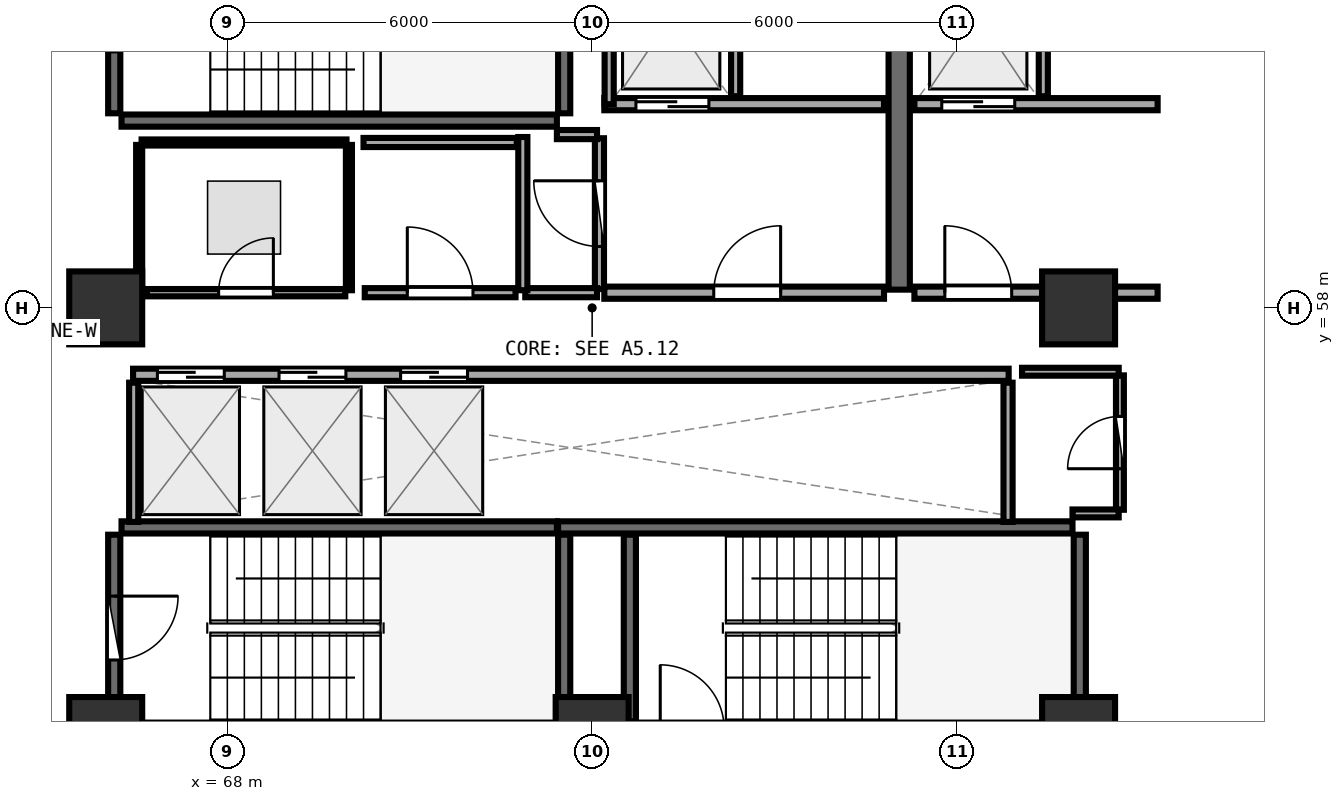
"""IFC4 building model, lengths in metres.
Left out: names, types, materials, properties, quantities, classifications, styles, units other than length and angle.
Written with IfcOpenShell. Run it as: python <this file> out.ifc"""

import sys

from ifc_helpers import new_model, si_unit, direction, frame, frame_2d, origin, origin_2d, place, context, subcontext, project, spatial, rectangle, extrude, element, fill, save


model = new_model("IFC4")
c1 = context("Model", 3, precision=1e-05, world=origin(), true_north=direction((0.0, 1.0)))
c2 = subcontext(c1, "Body", "Model", "MODEL_VIEW")
j1 = project(units=[si_unit("LENGTHUNIT", "METRE"), si_unit("PLANEANGLEUNIT", "RADIAN")], contexts=[c1])
p1 = place(None, origin())
s1 = spatial("IfcSite", under=j1, at=p1, CompositionType="ELEMENT")
p2 = place(p1, origin())
s2 = spatial("IfcBuilding", under=s1, at=p2, CompositionType="ELEMENT")
p3 = place(p2, frame((0.0, 0.0, 180.6)))
s3 = spatial("IfcBuildingStorey", under=s2, at=p3, CompositionType="ELEMENT", Elevation=180.6)
for number, where, z_axis, x_axis in (
    (1, (66.0, 51.0, 0.0), (0.0, 0.0, 1.0), (1.0, 0.0, 0.0)),
    (2, (74.0, 51.0, 0.0), (0.0, 0.0, 1.0), (1.0, 0.0, 0.0)),
    (3, (82.0, 51.0, 0.0), (0.0, 0.0, 1.0), (1.0, 0.0, 0.0)),
    (4, (82.0, 58.0, 0.0), (0.0, 0.0, 1.0), (1.0, 0.0, 0.0)),
    (5, (66.0, 58.0, 0.0), (0.0, 0.0, 1.0), (1.0, 0.0, 0.0)),
):
    element("IfcColumn", number, at=place(p3, frame(where, z_axis=z_axis, x_axis=x_axis)), inside=s3, PredefinedType="PILASTER", context=c2, shape_type="SweptSolid", body=[
        extrude(rectangle(XDim=1.2, YDim=1.2, at=origin_2d()), origin(), (0.0, 0.0, 1.0), 3.75),
    ])
p4 = place(p3, frame((66.26, 61.08, 0.0), z_axis=(0.0, 0.0, 1.0), x_axis=(1.0, 0.0, 0.0)))
e6 = element("IfcWall", 6, at=p4, inside=s3, PredefinedType="SHEAR", context=c2, shape_type="SweptSolid", body=[
    extrude(rectangle(XDim=7.16, YDim=0.2, at=frame_2d((3.58, 0.0))), origin(), (0.0, 0.0, 1.0), 3.49),
])
p5 = place(p3, frame((73.54, 61.2, 0.0), z_axis=(0.0, 0.0, 1.0), x_axis=(0.0, 1.0, 0.0)))
e7 = element("IfcWall", 7, at=p5, inside=s3, PredefinedType="SHEAR", context=c2, shape_type="SweptSolid", body=[
    extrude(rectangle(XDim=3.07, YDim=0.2, at=frame_2d((1.535, 0.0))), origin(), (0.0, 0.0, 1.0), 3.49),
])
p6 = place(p3, frame((66.14, 64.27, 0.0), z_axis=(0.0, 0.0, 1.0), x_axis=(0.0, -1.0, 0.0)))
e8 = element("IfcWall", 8, at=p6, inside=s3, PredefinedType="SHEAR", context=c2, shape_type="SweptSolid", body=[
    extrude(rectangle(XDim=3.07, YDim=0.2, at=frame_2d((1.535, 0.0))), origin(), (0.0, 0.0, 1.0), 3.49),
])
p7 = place(p6, frame((1.01, 0.0, 0.0)))
e9 = element("IfcOpeningElement", 9, at=p7, cuts=e8, PredefinedType="OPENING", context=c2, shape_type="SweptSolid", body=[
    extrude(rectangle(XDim=1.05, YDim=2.1, at=frame_2d((0.525, 1.05))), frame((0.0, 0.11, 0.0), z_axis=(0.0, -1.0, 0.0), x_axis=(1.0, 0.0, 0.0)), (0.0, 0.0, 1.0), 0.22),
])
p8 = place(p3, frame((82.02, 51.2, 0.0), z_axis=(0.0, 0.0, 1.0), x_axis=(0.0, 1.0, 0.0)))
e10 = element("IfcWall", 10, at=p8, inside=s3, PredefinedType="SHEAR", context=c2, shape_type="SweptSolid", body=[
    extrude(rectangle(XDim=3.07, YDim=0.2, at=frame_2d((1.535, 0.0))), origin(), (0.0, 0.0, 1.0), 3.49),
])
p9 = place(p3, frame((81.9, 54.39, 0.0), z_axis=(0.0, 0.0, 1.0), x_axis=(-1.0, 0.0, 0.0)))
e11 = element("IfcWall", 11, at=p9, inside=s3, PredefinedType="SHEAR", context=c2, shape_type="SweptSolid", body=[
    extrude(rectangle(XDim=8.46, YDim=0.2, at=frame_2d((4.23, 0.0))), origin(), (0.0, 0.0, 1.0), 3.49),
])
for number, where, z_axis, x_axis in (
    (12, (74.62, 54.27, 0.0), (0.0, 0.0, 1.0), (0.0, -1.0, 0.0)),
    (13, (73.54, 51.2, 0.0), (0.0, 0.0, 1.0), (0.0, 1.0, 0.0)),
):
    element("IfcWall", number, at=place(p3, frame(where, z_axis=z_axis, x_axis=x_axis)), inside=s3, PredefinedType="SHEAR", context=c2, shape_type="SweptSolid", body=[
        extrude(rectangle(XDim=3.07, YDim=0.2, at=frame_2d((1.535, 0.0))), origin(), (0.0, 0.0, 1.0), 3.49),
    ])
p10 = place(p3, frame((73.42, 54.39, 0.0), z_axis=(0.0, 0.0, 1.0), x_axis=(-1.0, 0.0, 0.0)))
e14 = element("IfcWall", 14, at=p10, inside=s3, PredefinedType="SHEAR", context=c2, shape_type="SweptSolid", body=[
    extrude(rectangle(XDim=7.16, YDim=0.2, at=frame_2d((3.58, 0.0))), origin(), (0.0, 0.0, 1.0), 3.49),
])
p11 = place(p3, frame((66.14, 54.27, 0.0), z_axis=(0.0, 0.0, 1.0), x_axis=(0.0, -1.0, 0.0)))
e15 = element("IfcWall", 15, at=p11, inside=s3, PredefinedType="SHEAR", context=c2, shape_type="SweptSolid", body=[
    extrude(rectangle(XDim=3.07, YDim=0.2, at=frame_2d((1.535, 0.0))), origin(), (0.0, 0.0, 1.0), 3.49),
])
p12 = place(p11, frame((1.01, 0.0, 0.0)))
e16 = element("IfcOpeningElement", 16, at=p12, cuts=e15, PredefinedType="OPENING", context=c2, shape_type="SweptSolid", body=[
    extrude(rectangle(XDim=1.05, YDim=2.1, at=frame_2d((0.525, 1.05))), frame((0.0, 0.11, 0.0), z_axis=(0.0, -1.0, 0.0), x_axis=(1.0, 0.0, 0.0)), (0.0, 0.0, 1.0), 0.22),
])
p13 = place(p3, frame((79.05, 58.3, 0.0), z_axis=(0.0, 0.0, 1.0), x_axis=(0.0, 1.0, 0.0)))
e17 = element("IfcWall", 17, at=p13, inside=s3, PredefinedType="SHEAR", context=c2, shape_type="SweptSolid", body=[
    extrude(rectangle(XDim=6.3, YDim=0.35, at=frame_2d((3.15, 0.0))), origin(), (0.0, 0.0, 1.0), 3.49),
])
p14 = place(p3, frame((74.2, 61.35, 0.0), z_axis=(0.0, 0.0, 1.0), x_axis=(1.0, 0.0, 0.0)))
e18 = element("IfcWall", 18, at=p14, inside=s3, PredefinedType="SOLIDWALL", context=c2, shape_type="SweptSolid", body=[
    extrude(rectangle(XDim=4.6, YDim=0.2, at=frame_2d((2.3, 0.0))), origin(), (0.0, 0.0, 1.0), 3.48),
])
p15 = place(p14, frame((0.52, 0.0, 0.0)))
e19 = element("IfcOpeningElement", 19, at=p15, cuts=e18, PredefinedType="OPENING", context=c2, shape_type="SweptSolid", body=[
    extrude(rectangle(XDim=1.2, YDim=2.15, at=frame_2d((0.6, 1.075))), frame((0.0, 0.11, 0.0), z_axis=(0.0, -1.0, 0.0), x_axis=(1.0, 0.0, 0.0)), (0.0, 0.0, 1.0), 0.22),
])
p16 = place(p3, frame((74.28, 61.35, 0.0), z_axis=(0.0, 0.0, 1.0), x_axis=(0.0, 1.0, 0.0)))
e20 = element("IfcWall", 20, at=p16, inside=s3, PredefinedType="PARTITIONING", context=c2, shape_type="SweptSolid", body=[
    extrude(rectangle(XDim=2.97, YDim=0.15, at=frame_2d((1.485, 0.0))), origin(), (0.0, 0.0, 1.0), 3.48),
])
p17 = place(p3, frame((76.36, 61.48, 0.0), z_axis=(0.0, 0.0, 1.0), x_axis=(0.0, 1.0, 0.0)))
e21 = element("IfcWall", 21, at=p17, inside=s3, PredefinedType="PARTITIONING", context=c2, shape_type="SweptSolid", body=[
    extrude(rectangle(XDim=2.84, YDim=0.15, at=frame_2d((1.42, 0.0))), origin(), (0.0, 0.0, 1.0), 3.48),
])
p18 = place(p3, frame((79.3, 61.35, 0.0), z_axis=(0.0, 0.0, 1.0), x_axis=(1.0, 0.0, 0.0)))
e22 = element("IfcWall", 22, at=p18, inside=s3, PredefinedType="SOLIDWALL", context=c2, shape_type="SweptSolid", body=[
    extrude(rectangle(XDim=4.0, YDim=0.2, at=frame_2d((2.0, 0.0))), origin(), (0.0, 0.0, 1.0), 2.775),
])
p19 = place(p18, frame((0.45, 0.0, 0.0)))
e23 = element("IfcOpeningElement", 23, at=p19, cuts=e22, PredefinedType="OPENING", context=c2, shape_type="SweptSolid", body=[
    extrude(rectangle(XDim=1.2, YDim=2.15, at=frame_2d((0.6, 1.075))), frame((0.0, 0.11, 0.0), z_axis=(0.0, -1.0, 0.0), x_axis=(1.0, 0.0, 0.0)), (0.0, 0.0, 1.0), 0.22),
])
p20 = place(p3, frame((81.42, 61.48, 0.0), z_axis=(0.0, 0.0, 1.0), x_axis=(0.0, 1.0, 0.0)))
e24 = element("IfcWall", 24, at=p20, inside=s3, PredefinedType="PARTITIONING", context=c2, shape_type="SweptSolid", body=[
    extrude(rectangle(XDim=2.84, YDim=0.15, at=frame_2d((1.42, 0.0))), origin(), (0.0, 0.0, 1.0), 3.48),
])
p21 = place(p3, frame((74.2, 58.25, 0.0), z_axis=(0.0, 0.0, 1.0), x_axis=(1.0, 0.0, 0.0)))
e25 = element("IfcWall", 25, at=p21, inside=s3, PredefinedType="SOLIDWALL", context=c2, shape_type="SweptSolid", body=[
    extrude(rectangle(XDim=4.6, YDim=0.2, at=frame_2d((2.3, 0.0))), origin(), (0.0, 0.0, 1.0), 3.48),
])
p22 = place(p21, frame((1.8, 0.0, 0.0)))
e26 = element("IfcOpeningElement", 26, at=p22, cuts=e25, PredefinedType="OPENING", context=c2, shape_type="SweptSolid", body=[
    extrude(rectangle(XDim=1.1, YDim=2.1, at=frame_2d((0.55, 1.05))), frame((0.0, 0.11, 0.0), z_axis=(0.0, -1.0, 0.0), x_axis=(1.0, 0.0, 0.0)), (0.0, 0.0, 1.0), 0.22),
])
p23 = place(p3, frame((79.3, 58.25, 0.0), z_axis=(0.0, 0.0, 1.0), x_axis=(1.0, 0.0, 0.0)))
e27 = element("IfcWall", 27, at=p23, inside=s3, PredefinedType="SOLIDWALL", context=c2, shape_type="SweptSolid", body=[
    extrude(rectangle(XDim=4.0, YDim=0.2, at=frame_2d((2.0, 0.0))), origin(), (0.0, 0.0, 1.0), 2.775),
])
p24 = place(p23, frame((0.5, 0.0, 0.0)))
e28 = element("IfcOpeningElement", 28, at=p24, cuts=e27, PredefinedType="OPENING", context=c2, shape_type="SweptSolid", body=[
    extrude(rectangle(XDim=1.1, YDim=2.1, at=frame_2d((0.55, 1.05))), frame((0.0, 0.11, 0.0), z_axis=(0.0, -1.0, 0.0), x_axis=(1.0, 0.0, 0.0)), (0.0, 0.0, 1.0), 0.22),
])
p25 = place(p3, frame((66.45, 56.9, 0.0), z_axis=(0.0, 0.0, 1.0), x_axis=(1.0, 0.0, 0.0)))
e29 = element("IfcWall", 29, at=p25, inside=s3, PredefinedType="SOLIDWALL", context=c2, shape_type="SweptSolid", body=[
    extrude(rectangle(XDim=14.4, YDim=0.2, at=frame_2d((7.2, 0.0))), origin(), (0.0, 0.0, 1.0), 3.48),
])
p26 = place(p25, frame((0.4, 0.0, 0.0)))
e30 = element("IfcOpeningElement", 30, at=p26, cuts=e29, PredefinedType="OPENING", context=c2, shape_type="SweptSolid", body=[
    extrude(rectangle(XDim=1.1, YDim=2.1, at=frame_2d((0.55, 1.05))), frame((0.0, 0.11, 0.0), z_axis=(0.0, -1.0, 0.0), x_axis=(1.0, 0.0, 0.0)), (0.0, 0.0, 1.0), 0.22),
])
p27 = place(p25, frame((2.4, 0.0, 0.0)))
e31 = element("IfcOpeningElement", 31, at=p27, cuts=e29, PredefinedType="OPENING", context=c2, shape_type="SweptSolid", body=[
    extrude(rectangle(XDim=1.1, YDim=2.1, at=frame_2d((0.55, 1.05))), frame((0.0, 0.11, 0.0), z_axis=(0.0, -1.0, 0.0), x_axis=(1.0, 0.0, 0.0)), (0.0, 0.0, 1.0), 0.22),
])
p28 = place(p25, frame((4.4, 0.0, 0.0)))
e32 = element("IfcOpeningElement", 32, at=p28, cuts=e29, PredefinedType="OPENING", context=c2, shape_type="SweptSolid", body=[
    extrude(rectangle(XDim=1.1, YDim=2.1, at=frame_2d((0.55, 1.05))), frame((0.0, 0.11, 0.0), z_axis=(0.0, -1.0, 0.0), x_axis=(1.0, 0.0, 0.0)), (0.0, 0.0, 1.0), 0.22),
])
for number, where, z_axis, x_axis in (
    (33, (66.46, 54.48, 0.0), (0.0, 0.0, 1.0), (0.0, 1.0, 0.0)),
    (34, (80.84, 54.48, 0.0), (0.0, 0.0, 1.0), (0.0, 1.0, 0.0)),
):
    element("IfcWall", number, at=place(p3, frame(where, z_axis=z_axis, x_axis=x_axis)), inside=s3, PredefinedType="PARTITIONING", context=c2, shape_type="SweptSolid", body=[
        extrude(rectangle(XDim=2.29, YDim=0.15, at=frame_2d((1.145, 0.0))), origin(), (0.0, 0.0, 1.0), 3.48),
    ])
p29 = place(p3, frame((74.12, 58.31, 0.0), z_axis=(0.0, 0.0, 1.0), x_axis=(0.0, 1.0, 0.0)))
e35 = element("IfcWall", 35, at=p29, inside=s3, PredefinedType="PARTITIONING", context=c2, shape_type="SweptSolid", body=[
    extrude(rectangle(XDim=2.48, YDim=0.15, at=frame_2d((1.24, 0.0))), origin(), (0.0, 0.0, 1.0), 3.48),
])
p30 = place(p29, frame((0.7, 0.0, 0.0)))
e36 = element("IfcOpeningElement", 36, at=p30, cuts=e35, PredefinedType="OPENING", context=c2, shape_type="SweptSolid", body=[
    extrude(rectangle(XDim=1.08, YDim=2.1, at=frame_2d((0.54, 1.05))), frame((0.0, 0.085, 0.0), z_axis=(0.0, -1.0, 0.0), x_axis=(1.0, 0.0, 0.0)), (0.0, 0.0, 1.0), 0.17),
])
p31 = place(p3, frame((82.68, 54.68, 0.0), z_axis=(0.0, 0.0, 1.0), x_axis=(0.0, 1.0, 0.0)))
e37 = element("IfcWall", 37, at=p31, inside=s3, PredefinedType="PLUMBINGWALL", context=c2, shape_type="SweptSolid", body=[
    extrude(rectangle(XDim=2.21, YDim=0.13, at=frame_2d((1.105, 0.0))), origin(), (0.0, 0.0, 1.0), 3.48),
])
p32 = place(p31, frame((0.675, 0.0, 0.0)))
e38 = element("IfcOpeningElement", 38, at=p32, cuts=e37, PredefinedType="OPENING", context=c2, shape_type="SweptSolid", body=[
    extrude(rectangle(XDim=0.86, YDim=2.05, at=frame_2d((0.43, 1.025))), frame((0.0, 0.075, 0.0), z_axis=(0.0, -1.0, 0.0), x_axis=(1.0, 0.0, 0.0)), (0.0, 0.0, 1.0), 0.15),
])
p33 = place(p3, frame((66.675, 58.25, 0.0), z_axis=(0.0, 0.0, 1.0), x_axis=(1.0, 0.0, 0.0)))
e39 = element("IfcWall", 39, at=p33, inside=s3, PredefinedType="PARTITIONING", context=c2, shape_type="SweptSolid", body=[
    extrude(rectangle(XDim=3.265, YDim=0.12, at=frame_2d((1.632, 0.0))), origin(), (0.0, 0.0, 1.0), 3.48),
])
p34 = place(p33, frame((1.182, 0.0, 0.0)))
e40 = element("IfcOpeningElement", 40, at=p34, cuts=e39, PredefinedType="OPENING", context=c2, shape_type="SweptSolid", body=[
    extrude(rectangle(XDim=0.9, YDim=2.08, at=frame_2d((0.45, 1.04))), frame((0.0, 0.07, 0.0), z_axis=(0.0, -1.0, 0.0), x_axis=(1.0, 0.0, 0.0)), (0.0, 0.0, 1.0), 0.14),
])
p35 = place(p3, frame((70.26, 58.25, 0.0), z_axis=(0.0, 0.0, 1.0), x_axis=(1.0, 0.0, 0.0)))
e41 = element("IfcWall", 41, at=p35, inside=s3, PredefinedType="PARTITIONING", context=c2, shape_type="SweptSolid", body=[
    extrude(rectangle(XDim=2.48, YDim=0.15, at=frame_2d((1.24, 0.0))), origin(), (0.0, 0.0, 1.0), 3.48),
])
p36 = place(p35, frame((0.7, 0.0, 0.0)))
e42 = element("IfcOpeningElement", 42, at=p36, cuts=e41, PredefinedType="OPENING", context=c2, shape_type="SweptSolid", body=[
    extrude(rectangle(XDim=1.08, YDim=2.1, at=frame_2d((0.54, 1.05))), frame((0.0, 0.085, 0.0), z_axis=(0.0, -1.0, 0.0), x_axis=(1.0, 0.0, 0.0)), (0.0, 0.0, 1.0), 0.17),
])
p37 = place(p3, frame((72.9, 58.25, 0.0), z_axis=(0.0, 0.0, 1.0), x_axis=(1.0, 0.0, 0.0)))
e43 = element("IfcWall", 43, at=p37, inside=s3, PredefinedType="PARTITIONING", context=c2, shape_type="SweptSolid", body=[
    extrude(rectangle(XDim=1.18, YDim=0.15, at=frame_2d((0.59, 0.0))), origin(), (0.0, 0.0, 1.0), 3.48),
])
p38 = place(p3, frame((74.08, 60.85, 0.0), z_axis=(0.0, 0.0, 1.0), x_axis=(-1.0, 0.0, 0.0)))
e44 = element("IfcWall", 44, at=p38, inside=s3, PredefinedType="PARTITIONING", context=c2, shape_type="SweptSolid", body=[
    extrude(rectangle(XDim=0.66, YDim=0.15, at=frame_2d((0.33, 0.0))), origin(), (0.0, 0.0, 1.0), 3.48),
])
p39 = place(p3, frame((72.86, 60.81, 0.0), z_axis=(0.0, 0.0, 1.0), x_axis=(0.0, -1.0, 0.0)))
e45 = element("IfcWall", 45, at=p39, inside=s3, PredefinedType="PARTITIONING", context=c2, shape_type="SweptSolid", body=[
    extrude(rectangle(XDim=2.52, YDim=0.15, at=frame_2d((1.26, 0.0))), origin(), (0.0, 0.0, 1.0), 3.48),
])
p40 = place(p3, frame((81.9, 54.62, 0.0), z_axis=(0.0, 0.0, 1.0), x_axis=(1.0, 0.0, 0.0)))
e46 = element("IfcWall", 46, at=p40, inside=s3, PredefinedType="PLUMBINGWALL", context=c2, shape_type="SweptSolid", body=[
    extrude(rectangle(XDim=0.76, YDim=0.13, at=frame_2d((0.38, 0.0))), origin(), (0.0, 0.0, 1.0), 2.775),
])
p41 = place(p3, frame((82.66, 56.95, 0.0), z_axis=(0.0, 0.0, 1.0), x_axis=(-1.0, 0.0, 0.0)))
e47 = element("IfcWall", 47, at=p41, inside=s3, PredefinedType="PLUMBINGWALL", context=c2, shape_type="SweptSolid", body=[
    extrude(rectangle(XDim=1.59, YDim=0.13, at=frame_2d((0.795, 0.0))), origin(), (0.0, 0.0, 1.0), 2.775),
])
p42 = place(p3, frame((70.0, 58.29, 0.0), z_axis=(0.0, 0.0, 1.0), x_axis=(0.0, 1.0, 0.0)))
e48 = element("IfcWall", 48, at=p42, inside=s3, PredefinedType="PARTITIONING", context=c2, shape_type="SweptSolid", body=[
    extrude(rectangle(XDim=2.39, YDim=0.1, at=frame_2d((1.195, 0.0))), origin(), (0.0, 0.0, 1.0), 3.48),
])
p43 = place(p3, frame((69.96, 60.72, 0.0), z_axis=(0.0, 0.0, 1.0), x_axis=(-1.0, 0.0, 0.0)))
e49 = element("IfcWall", 49, at=p43, inside=s3, PredefinedType="PARTITIONING", context=c2, shape_type="SweptSolid", body=[
    extrude(rectangle(XDim=3.37, YDim=0.1, at=frame_2d((1.685, 0.0))), origin(), (0.0, 0.0, 1.0), 3.48),
])
p44 = place(p3, frame((66.55, 60.68, 0.0), z_axis=(0.0, 0.0, 1.0), x_axis=(0.0, -1.0, 0.0)))
e50 = element("IfcWall", 50, at=p44, inside=s3, PredefinedType="PARTITIONING", context=c2, shape_type="SweptSolid", body=[
    extrude(rectangle(XDim=2.383, YDim=0.1, at=frame_2d((1.191, 0.0))), origin(), (0.0, 0.0, 1.0), 3.48),
])
p45 = place(p3, frame((72.76, 60.72, 0.0), z_axis=(0.0, 0.0, 1.0), x_axis=(-1.0, 0.0, 0.0)))
e51 = element("IfcWall", 51, at=p45, inside=s3, PredefinedType="PARTITIONING", context=c2, shape_type="SweptSolid", body=[
    extrude(rectangle(XDim=2.52, YDim=0.15, at=frame_2d((1.26, 0.0))), origin(), (0.0, 0.0, 1.0), 3.48),
])
p46 = place(p3, frame((84.293, 49.708, 0.0), z_axis=(0.0, 0.0, 1.0), x_axis=(0.566732833033, 0.823901630028, 0.0)))
e52 = element("IfcWall", 52, at=p46, inside=s3, PredefinedType="PARTITIONING", context=c2, shape_type="SweptSolid", body=[
    extrude(rectangle(XDim=4.52, YDim=0.1, at=frame_2d((2.26, 0.0))), origin(), (0.0, 0.0, 1.0), 2.975),
])
p47 = place(p3, frame((87.455, 60.83, 0.0), z_axis=(0.0, 0.0, 1.0), x_axis=(-0.532779908113, 0.846253844606, 0.0)))
e53 = element("IfcWall", 53, at=p47, inside=s3, PredefinedType="PARTITIONING", context=c2, shape_type="SweptSolid", body=[
    extrude(rectangle(XDim=7.182, YDim=0.1, at=frame_2d((3.591, 0.0))), origin(), (0.0, 0.0, 1.0), 2.975),
])
p48 = place(p12, origin())
e54 = element("IfcDoor", 54, at=p48, inside=s3, OperationType="SINGLE_SWING_LEFT", PredefinedType="DOOR", context=c2, shape_type="SweptSolid", body=[
    extrude(rectangle(XDim=1.05, YDim=2.1, at=frame_2d((0.525, 1.05))), frame((0.0, 0.025, 0.0), z_axis=(0.0, -1.0, 0.0), x_axis=(1.0, 0.0, 0.0)), (0.0, 0.0, 1.0), 0.05),
])
fill(e16, e54)
p49 = place(p15, origin())
e55 = element("IfcDoor", 55, at=p49, inside=s3, OperationType="DOUBLE_DOOR_SLIDING", PredefinedType="DOOR", context=c2, shape_type="SweptSolid", body=[
    extrude(rectangle(XDim=1.2, YDim=2.15, at=frame_2d((0.6, 1.075))), frame((0.0, 0.025, 0.0), z_axis=(0.0, -1.0, 0.0), x_axis=(1.0, 0.0, 0.0)), (0.0, 0.0, 1.0), 0.05),
])
fill(e19, e55)
p50 = place(p19, origin())
e56 = element("IfcDoor", 56, at=p50, inside=s3, OperationType="DOUBLE_DOOR_SLIDING", PredefinedType="DOOR", context=c2, shape_type="SweptSolid", body=[
    extrude(rectangle(XDim=1.2, YDim=2.15, at=frame_2d((0.6, 1.075))), frame((0.0, 0.025, 0.0), z_axis=(0.0, -1.0, 0.0), x_axis=(1.0, 0.0, 0.0)), (0.0, 0.0, 1.0), 0.05),
])
fill(e23, e56)
p51 = place(p22, frame((1.1, 0.0, 0.0), z_axis=(0.0, 0.0, 1.0), x_axis=(-1.0, 0.0, 0.0)))
e57 = element("IfcDoor", 57, at=p51, inside=s3, OperationType="SINGLE_SWING_LEFT", PredefinedType="DOOR", context=c2, shape_type="SweptSolid", body=[
    extrude(rectangle(XDim=1.1, YDim=2.1, at=frame_2d((0.55, 1.05))), frame((0.0, 0.025, 0.0), z_axis=(0.0, -1.0, 0.0), x_axis=(1.0, 0.0, 0.0)), (0.0, 0.0, 1.0), 0.05),
])
fill(e26, e57)
p52 = place(p24, frame((1.1, 0.0, 0.0), z_axis=(0.0, 0.0, 1.0), x_axis=(-1.0, 0.0, 0.0)))
e58 = element("IfcDoor", 58, at=p52, inside=s3, OperationType="SINGLE_SWING_RIGHT", PredefinedType="DOOR", context=c2, shape_type="SweptSolid", body=[
    extrude(rectangle(XDim=1.1, YDim=2.1, at=frame_2d((0.55, 1.05))), frame((0.0, 0.025, 0.0), z_axis=(0.0, -1.0, 0.0), x_axis=(1.0, 0.0, 0.0)), (0.0, 0.0, 1.0), 0.05),
])
fill(e28, e58)
p53 = place(p26, origin())
e59 = element("IfcDoor", 59, at=p53, inside=s3, OperationType="DOUBLE_DOOR_SLIDING", PredefinedType="DOOR", context=c2, shape_type="SweptSolid", body=[
    extrude(rectangle(XDim=1.1, YDim=2.1, at=frame_2d((0.55, 1.05))), frame((0.0, 0.025, 0.0), z_axis=(0.0, -1.0, 0.0), x_axis=(1.0, 0.0, 0.0)), (0.0, 0.0, 1.0), 0.05),
])
fill(e30, e59)
p54 = place(p27, origin())
e60 = element("IfcDoor", 60, at=p54, inside=s3, OperationType="DOUBLE_DOOR_SLIDING", PredefinedType="DOOR", context=c2, shape_type="SweptSolid", body=[
    extrude(rectangle(XDim=1.1, YDim=2.1, at=frame_2d((0.55, 1.05))), frame((0.0, 0.025, 0.0), z_axis=(0.0, -1.0, 0.0), x_axis=(1.0, 0.0, 0.0)), (0.0, 0.0, 1.0), 0.05),
])
fill(e31, e60)
p55 = place(p28, origin())
e61 = element("IfcDoor", 61, at=p55, inside=s3, OperationType="DOUBLE_DOOR_SLIDING", PredefinedType="DOOR", context=c2, shape_type="SweptSolid", body=[
    extrude(rectangle(XDim=1.1, YDim=2.1, at=frame_2d((0.55, 1.05))), frame((0.0, 0.025, 0.0), z_axis=(0.0, -1.0, 0.0), x_axis=(1.0, 0.0, 0.0)), (0.0, 0.0, 1.0), 0.05),
])
fill(e32, e61)
p56 = place(p30, origin())
e62 = element("IfcDoor", 62, at=p56, inside=s3, OperationType="SINGLE_SWING_RIGHT", PredefinedType="DOOR", context=c2, shape_type="SweptSolid", body=[
    extrude(rectangle(XDim=1.08, YDim=2.1, at=frame_2d((0.54, 1.05))), frame((0.0, 0.025, 0.0), z_axis=(0.0, -1.0, 0.0), x_axis=(1.0, 0.0, 0.0)), (0.0, 0.0, 1.0), 0.05),
])
fill(e36, e62)
p57 = place(p32, origin())
e63 = element("IfcDoor", 63, at=p57, inside=s3, OperationType="SINGLE_SWING_LEFT", PredefinedType="DOOR", context=c2, shape_type="SweptSolid", body=[
    extrude(rectangle(XDim=0.86, YDim=2.05, at=frame_2d((0.43, 1.025))), frame((0.0, 0.025, 0.0), z_axis=(0.0, -1.0, 0.0), x_axis=(1.0, 0.0, 0.0)), (0.0, 0.0, 1.0), 0.05),
])
fill(e38, e63)
p58 = place(p34, origin())
e64 = element("IfcDoor", 64, at=p58, inside=s3, OperationType="SINGLE_SWING_RIGHT", PredefinedType="DOOR", context=c2, shape_type="SweptSolid", body=[
    extrude(rectangle(XDim=0.9, YDim=2.08, at=frame_2d((0.45, 1.04))), frame((0.0, 0.025, 0.0), z_axis=(0.0, -1.0, 0.0), x_axis=(1.0, 0.0, 0.0)), (0.0, 0.0, 1.0), 0.05),
])
fill(e40, e64)
p59 = place(p36, origin())
e65 = element("IfcDoor", 65, at=p59, inside=s3, OperationType="SINGLE_SWING_LEFT", PredefinedType="DOOR", context=c2, shape_type="SweptSolid", body=[
    extrude(rectangle(XDim=1.08, YDim=2.1, at=frame_2d((0.54, 1.05))), frame((0.0, 0.025, 0.0), z_axis=(0.0, -1.0, 0.0), x_axis=(1.0, 0.0, 0.0)), (0.0, 0.0, 1.0), 0.05),
])
fill(e42, e65)
save(model, sys.argv[1])
